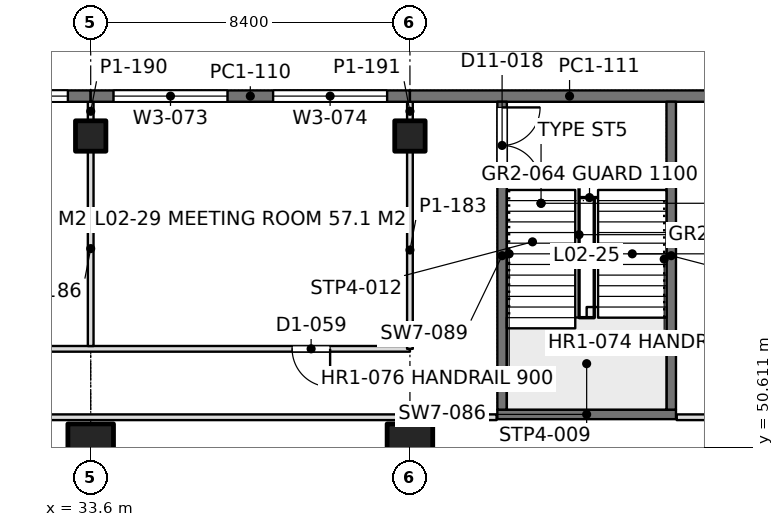
"""IFC4 building model, lengths in metres.
Left out: names, types, materials, properties, quantities, classifications, styles, units other than length and angle.
Written with IfcOpenShell. Run it as: python <this file> out.ifc"""

import sys

from ifc_helpers import new_model, si_unit, direction, frame, frame_2d, origin, origin_2d, place, context, subcontext, project, spatial, rectangle, extrude, element, fill, save


model = new_model("IFC4")
c1 = context("Model", 3, precision=1e-05, world=origin(), true_north=direction((0.0, 1.0)))
c2 = subcontext(c1, "Body", "Model", "MODEL_VIEW")
j1 = project(units=[si_unit("LENGTHUNIT", "METRE"), si_unit("PLANEANGLEUNIT", "RADIAN")], contexts=[c1])
p1 = place(None, origin())
s1 = spatial("IfcSite", under=j1, at=p1, CompositionType="ELEMENT")
p2 = place(p1, origin())
s2 = spatial("IfcBuilding", under=s1, at=p2, CompositionType="ELEMENT")
p3 = place(p2, frame((0.0, 0.0, 9.9)))
s3 = spatial("IfcBuildingStorey", under=s2, at=p3, CompositionType="ELEMENT", Elevation=9.9)
p4 = place(p3, frame((33.6, 50.4, 0.0), z_axis=(0.0, 0.0, 1.0), x_axis=(1.0, 0.0, 0.0)))
e1 = element("IfcColumn", 1, at=p4, inside=s3, PredefinedType="COLUMN", context=c2, shape_type="SweptSolid", body=[
    extrude(rectangle(XDim=1.2, YDim=1.65, at=origin_2d()), origin(), (0.0, 0.0, 1.0), 4.5),
])
p5 = place(p3, frame((33.6, 58.8, 0.0), z_axis=(0.0, 0.0, 1.0), x_axis=(1.0, 0.0, 0.0)))
e2 = element("IfcColumn", 2, at=p5, inside=s3, PredefinedType="COLUMN", context=c2, shape_type="SweptSolid", body=[
    extrude(rectangle(XDim=0.8, YDim=0.8, at=origin_2d()), origin(), (0.0, 0.0, 1.0), 4.5),
])
p6 = place(p3, frame((42.0, 50.4, 0.0), z_axis=(0.0, 0.0, 1.0), x_axis=(1.0, 0.0, 0.0)))
e3 = element("IfcColumn", 3, at=p6, inside=s3, PredefinedType="COLUMN", context=c2, shape_type="SweptSolid", body=[
    extrude(rectangle(XDim=1.2, YDim=1.65, at=origin_2d()), origin(), (0.0, 0.0, 1.0), 4.5),
])
p7 = place(p3, frame((42.0, 58.8, 0.0), z_axis=(0.0, 0.0, 1.0), x_axis=(1.0, 0.0, 0.0)))
e4 = element("IfcColumn", 4, at=p7, inside=s3, PredefinedType="COLUMN", context=c2, shape_type="SweptSolid", body=[
    extrude(rectangle(XDim=0.8, YDim=0.8, at=origin_2d()), origin(), (0.0, 0.0, 1.0), 4.5),
])
p8 = place(p3, frame((25.2, 59.85, 0.0), z_axis=(0.0, 0.0, 1.0), x_axis=(1.0, 0.0, 0.0)))
e5 = element("IfcWall", 5, at=p8, inside=s3, PredefinedType="SOLIDWALL", context=c2, shape_type="SweptSolid", body=[
    extrude(rectangle(XDim=8.4, YDim=0.3, at=frame_2d((4.2, 0.0))), origin(), (0.0, 0.0, 1.0), 4.3),
])
p9 = place(p8, frame((0.6, 0.0, 0.9)))
e6 = element("IfcOpeningElement", 6, at=p9, cuts=e5, PredefinedType="OPENING", context=c2, shape_type="SweptSolid", body=[
    extrude(rectangle(XDim=3.0, YDim=2.4, at=frame_2d((1.5, 1.2))), frame((0.0, 0.16, 0.0), z_axis=(0.0, -1.0, 0.0), x_axis=(1.0, 0.0, 0.0)), (0.0, 0.0, 1.0), 0.32),
])
p10 = place(p8, frame((4.8, 0.0, 0.9)))
e7 = element("IfcOpeningElement", 7, at=p10, cuts=e5, PredefinedType="OPENING", context=c2, shape_type="SweptSolid", body=[
    extrude(rectangle(XDim=3.0, YDim=2.4, at=frame_2d((1.5, 1.2))), frame((0.0, 0.16, 0.0), z_axis=(0.0, -1.0, 0.0), x_axis=(1.0, 0.0, 0.0)), (0.0, 0.0, 1.0), 0.32),
])
p11 = place(p3, frame((33.6, 59.85, 0.0), z_axis=(0.0, 0.0, 1.0), x_axis=(1.0, 0.0, 0.0)))
e8 = element("IfcWall", 8, at=p11, inside=s3, PredefinedType="SOLIDWALL", context=c2, shape_type="SweptSolid", body=[
    extrude(rectangle(XDim=8.4, YDim=0.3, at=frame_2d((4.2, 0.0))), origin(), (0.0, 0.0, 1.0), 4.3),
])
p12 = place(p11, frame((0.6, 0.0, 0.9)))
e9 = element("IfcOpeningElement", 9, at=p12, cuts=e8, PredefinedType="OPENING", context=c2, shape_type="SweptSolid", body=[
    extrude(rectangle(XDim=3.0, YDim=2.4, at=frame_2d((1.5, 1.2))), frame((0.0, 0.16, 0.0), z_axis=(0.0, -1.0, 0.0), x_axis=(1.0, 0.0, 0.0)), (0.0, 0.0, 1.0), 0.32),
])
p13 = place(p11, frame((4.8, 0.0, 0.9)))
e10 = element("IfcOpeningElement", 10, at=p13, cuts=e8, PredefinedType="OPENING", context=c2, shape_type="SweptSolid", body=[
    extrude(rectangle(XDim=3.0, YDim=2.4, at=frame_2d((1.5, 1.2))), frame((0.0, 0.16, 0.0), z_axis=(0.0, -1.0, 0.0), x_axis=(1.0, 0.0, 0.0)), (0.0, 0.0, 1.0), 0.32),
])
p14 = place(p3, frame((42.0, 59.85, 0.0), z_axis=(0.0, 0.0, 1.0), x_axis=(1.0, 0.0, 0.0)))
e11 = element("IfcWall", 11, at=p14, inside=s3, PredefinedType="SOLIDWALL", context=c2, shape_type="SweptSolid", body=[
    extrude(rectangle(XDim=8.4, YDim=0.3, at=frame_2d((4.2, 0.0))), origin(), (0.0, 0.0, 1.0), 4.3),
])
p15 = place(p3, frame((6.12, 51.4, 0.0), z_axis=(0.0, 0.0, 1.0), x_axis=(1.0, 0.0, 0.0)))
e12 = element("IfcWall", 12, at=p15, inside=s3, PredefinedType="PARTITIONING", context=c2, shape_type="SweptSolid", body=[
    extrude(rectangle(XDim=38.16, YDim=0.15, at=frame_2d((19.08, 0.0))), origin(), (0.0, 0.0, 1.0), 3.65),
])
p16 = place(p15, frame((13.98, 0.0, 0.0)))
e13 = element("IfcOpeningElement", 13, at=p16, cuts=e12, PredefinedType="OPENING", context=c2, shape_type="SweptSolid", body=[
    extrude(rectangle(XDim=1.8, YDim=2.2, at=frame_2d((0.9, 1.1))), frame((0.0, 0.085, 0.0), z_axis=(0.0, -1.0, 0.0), x_axis=(1.0, 0.0, 0.0)), (0.0, 0.0, 1.0), 0.17),
])
p17 = place(p15, frame((22.38, 0.0, 0.0)))
e14 = element("IfcOpeningElement", 14, at=p17, cuts=e12, PredefinedType="OPENING", context=c2, shape_type="SweptSolid", body=[
    extrude(rectangle(XDim=1.8, YDim=2.2, at=frame_2d((0.9, 1.1))), frame((0.0, 0.085, 0.0), z_axis=(0.0, -1.0, 0.0), x_axis=(1.0, 0.0, 0.0)), (0.0, 0.0, 1.0), 0.17),
])
p18 = place(p3, frame((49.02, 51.4, 0.0), z_axis=(0.0, 0.0, 1.0), x_axis=(1.0, 0.0, 0.0)))
e15 = element("IfcWall", 15, at=p18, inside=s3, PredefinedType="PARTITIONING", context=c2, shape_type="SweptSolid", body=[
    extrude(rectangle(XDim=4.18, YDim=0.15, at=frame_2d((2.09, 0.0))), origin(), (0.0, 0.0, 1.0), 3.65),
])
p19 = place(p3, frame((8.4, 53.2, 0.0), z_axis=(0.0, 0.0, 1.0), x_axis=(1.0, 0.0, 0.0)))
e16 = element("IfcWall", 16, at=p19, inside=s3, PredefinedType="PARTITIONING", context=c2, shape_type="SweptSolid", body=[
    extrude(rectangle(XDim=33.6, YDim=0.15, at=frame_2d((16.8, 0.0))), origin(), (0.0, 0.0, 1.0), 3.65),
])
p20 = place(p19, frame((5.3, 0.0, 0.0)))
e17 = element("IfcOpeningElement", 17, at=p20, cuts=e16, PredefinedType="OPENING", context=c2, shape_type="SweptSolid", body=[
    extrude(rectangle(XDim=1.0, YDim=2.2, at=frame_2d((0.5, 1.1))), frame((0.0, 0.085, 0.0), z_axis=(0.0, -1.0, 0.0), x_axis=(1.0, 0.0, 0.0)), (0.0, 0.0, 1.0), 0.17),
])
p21 = place(p19, frame((13.7, 0.0, 0.0)))
e18 = element("IfcOpeningElement", 18, at=p21, cuts=e16, PredefinedType="OPENING", context=c2, shape_type="SweptSolid", body=[
    extrude(rectangle(XDim=1.0, YDim=2.2, at=frame_2d((0.5, 1.1))), frame((0.0, 0.085, 0.0), z_axis=(0.0, -1.0, 0.0), x_axis=(1.0, 0.0, 0.0)), (0.0, 0.0, 1.0), 0.17),
])
p22 = place(p19, frame((22.1, 0.0, 0.0)))
e19 = element("IfcOpeningElement", 19, at=p22, cuts=e16, PredefinedType="OPENING", context=c2, shape_type="SweptSolid", body=[
    extrude(rectangle(XDim=1.0, YDim=2.2, at=frame_2d((0.5, 1.1))), frame((0.0, 0.085, 0.0), z_axis=(0.0, -1.0, 0.0), x_axis=(1.0, 0.0, 0.0)), (0.0, 0.0, 1.0), 0.17),
])
p23 = place(p19, frame((30.5, 0.0, 0.0)))
e20 = element("IfcOpeningElement", 20, at=p23, cuts=e16, PredefinedType="OPENING", context=c2, shape_type="SweptSolid", body=[
    extrude(rectangle(XDim=1.0, YDim=2.2, at=frame_2d((0.5, 1.1))), frame((0.0, 0.085, 0.0), z_axis=(0.0, -1.0, 0.0), x_axis=(1.0, 0.0, 0.0)), (0.0, 0.0, 1.0), 0.17),
])
p24 = place(p3, frame((33.6, 53.274, 0.0), z_axis=(0.0, 0.0, 1.0), x_axis=(0.0, 1.0, 0.0)))
e21 = element("IfcWall", 21, at=p24, inside=s3, PredefinedType="PARTITIONING", context=c2, shape_type="SweptSolid", body=[
    extrude(rectangle(XDim=5.127, YDim=0.15, at=frame_2d((2.563, 0.0))), origin(), (0.0, 0.0, 1.0), 3.65),
])
p25 = place(p3, frame((33.6, 59.199, 0.0), z_axis=(0.0, 0.0, 1.0), x_axis=(0.0, 1.0, 0.0)))
e22 = element("IfcWall", 22, at=p25, inside=s3, PredefinedType="PARTITIONING", context=c2, shape_type="SweptSolid", body=[
    extrude(rectangle(XDim=0.503, YDim=0.15, at=frame_2d((0.251, 0.0))), origin(), (0.0, 0.0, 1.0), 4.3),
])
p26 = place(p3, frame((42.0, 53.2, 0.0), z_axis=(0.0, 0.0, 1.0), x_axis=(0.0, 1.0, 0.0)))
e23 = element("IfcWall", 23, at=p26, inside=s3, PredefinedType="PARTITIONING", context=c2, shape_type="SweptSolid", body=[
    extrude(rectangle(XDim=5.201, YDim=0.15, at=frame_2d((2.601, 0.0))), origin(), (0.0, 0.0, 1.0), 3.65),
])
p27 = place(p3, frame((42.0, 59.199, 0.0), z_axis=(0.0, 0.0, 1.0), x_axis=(0.0, 1.0, 0.0)))
e24 = element("IfcWall", 24, at=p27, inside=s3, PredefinedType="PARTITIONING", context=c2, shape_type="SweptSolid", body=[
    extrude(rectangle(XDim=0.503, YDim=0.15, at=frame_2d((0.251, 0.0))), origin(), (0.0, 0.0, 1.0), 4.3),
])
p28 = place(p3, frame((44.425, 59.702, 0.0), z_axis=(0.0, 0.0, 1.0), x_axis=(0.0, -1.0, 0.0)))
e25 = element("IfcWall", 25, at=p28, inside=s3, PredefinedType="SOLIDWALL", context=c2, shape_type="SweptSolid", body=[
    extrude(rectangle(XDim=8.102, YDim=0.25, at=frame_2d((4.051, 0.0))), origin(), (0.0, 0.0, 1.0), 4.5),
])
p29 = place(p28, frame((0.15, 0.0, 0.0)))
e26 = element("IfcOpeningElement", 26, at=p29, cuts=e25, PredefinedType="OPENING", context=c2, shape_type="SweptSolid", body=[
    extrude(rectangle(XDim=2.0, YDim=2.2, at=frame_2d((1.0, 1.1))), frame((0.0, 0.135, 0.0), z_axis=(0.0, -1.0, 0.0), x_axis=(1.0, 0.0, 0.0)), (0.0, 0.0, 1.0), 0.27),
])
p30 = place(p3, frame((48.875, 59.702, 0.0), z_axis=(0.0, 0.0, 1.0), x_axis=(0.0, -1.0, 0.0)))
e27 = element("IfcWall", 27, at=p30, inside=s3, PredefinedType="SOLIDWALL", context=c2, shape_type="SweptSolid", body=[
    extrude(rectangle(XDim=8.102, YDim=0.25, at=frame_2d((4.051, 0.0))), origin(), (0.0, 0.0, 1.0), 4.5),
])
p31 = place(p3, frame((44.3, 51.475, 0.0), z_axis=(0.0, 0.0, 1.0), x_axis=(1.0, 0.0, 0.0)))
e28 = element("IfcWall", 28, at=p31, inside=s3, PredefinedType="SOLIDWALL", context=c2, shape_type="SweptSolid", body=[
    extrude(rectangle(XDim=4.7, YDim=0.25, at=frame_2d((2.35, 0.0))), origin(), (0.0, 0.0, 1.0), 4.5),
])
p32 = place(p10, origin())
e29 = element("IfcWindow", 29, at=p32, inside=s3, PartitioningType="SINGLE_PANEL", PredefinedType="WINDOW", context=c2, shape_type="SweptSolid", body=[
    extrude(rectangle(XDim=3.0, YDim=2.4, at=frame_2d((1.5, 1.2))), frame((0.0, 0.03, 0.0), z_axis=(0.0, -1.0, 0.0), x_axis=(1.0, 0.0, 0.0)), (0.0, 0.0, 1.0), 0.06),
])
fill(e7, e29)
p33 = place(p12, origin())
e30 = element("IfcWindow", 30, at=p33, inside=s3, PartitioningType="SINGLE_PANEL", PredefinedType="WINDOW", context=c2, shape_type="SweptSolid", body=[
    extrude(rectangle(XDim=3.0, YDim=2.4, at=frame_2d((1.5, 1.2))), frame((0.0, 0.03, 0.0), z_axis=(0.0, -1.0, 0.0), x_axis=(1.0, 0.0, 0.0)), (0.0, 0.0, 1.0), 0.06),
])
fill(e9, e30)
p34 = place(p13, origin())
e31 = element("IfcWindow", 31, at=p34, inside=s3, PartitioningType="SINGLE_PANEL", PredefinedType="WINDOW", context=c2, shape_type="SweptSolid", body=[
    extrude(rectangle(XDim=3.0, YDim=2.4, at=frame_2d((1.5, 1.2))), frame((0.0, 0.03, 0.0), z_axis=(0.0, -1.0, 0.0), x_axis=(1.0, 0.0, 0.0)), (0.0, 0.0, 1.0), 0.06),
])
fill(e10, e31)
p35 = place(p23, frame((1.0, 0.0, 0.0), z_axis=(0.0, 0.0, 1.0), x_axis=(-1.0, 0.0, 0.0)))
e32 = element("IfcDoor", 32, at=p35, inside=s3, OperationType="SINGLE_SWING_LEFT", PredefinedType="DOOR", context=c2, shape_type="SweptSolid", body=[
    extrude(rectangle(XDim=1.0, YDim=2.2, at=frame_2d((0.5, 1.1))), frame((0.0, 0.025, 0.0), z_axis=(0.0, -1.0, 0.0), x_axis=(1.0, 0.0, 0.0)), (0.0, 0.0, 1.0), 0.05),
])
fill(e20, e32)
p36 = place(p29, origin())
e33 = element("IfcDoor", 33, at=p36, inside=s3, OperationType="DOUBLE_DOOR_SINGLE_SWING", PredefinedType="DOOR", context=c2, shape_type="SweptSolid", body=[
    extrude(rectangle(XDim=2.0, YDim=2.2, at=frame_2d((1.0, 1.1))), frame((0.0, 0.025, 0.0), z_axis=(0.0, -1.0, 0.0), x_axis=(1.0, 0.0, 0.0)), (0.0, 0.0, 1.0), 0.05),
])
fill(e26, e33)
save(model, sys.argv[1])
